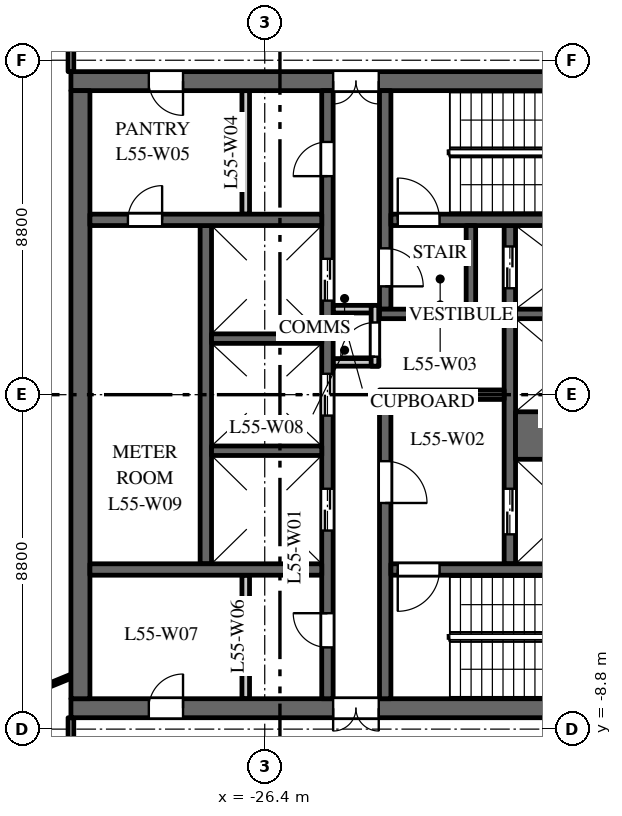
"""IFC4 building model, lengths in metres.
Left out: names, types, materials, properties, quantities, classifications, styles, units other than length and angle.
Written with IfcOpenShell. Run it as: python <this file> out.ifc"""

import sys

from ifc_helpers import new_model, si_unit, direction, frame, frame_2d, origin, place, context, subcontext, project, spatial, rectangle, extrude, element, fill, save


model = new_model("IFC4")
c1 = context("Model", 3, precision=1e-05, world=origin(), true_north=direction((0.0, 1.0)))
c2 = subcontext(c1, "Body", "Model", "MODEL_VIEW")
j1 = project(units=[si_unit("LENGTHUNIT", "METRE"), si_unit("PLANEANGLEUNIT", "RADIAN")], contexts=[c1])
p1 = place(None, origin())
s1 = spatial("IfcSite", under=j1, at=p1, CompositionType="ELEMENT")
p2 = place(p1, origin())
s2 = spatial("IfcBuilding", under=s1, at=p2, CompositionType="ELEMENT")
p3 = place(p2, frame((0.0, 0.0, 261.5)))
s3 = spatial("IfcBuildingStorey", under=s2, at=p3, CompositionType="ELEMENT", Elevation=261.5)
p4 = place(p3, frame((-16.5, 8.25, 0.0), z_axis=(0.0, 0.0, 1.0), x_axis=(-1.0, 0.0, 0.0)))
e1 = element("IfcWall", 1, at=p4, inside=s3, PredefinedType="SHEAR", context=c2, shape_type="SweptSolid", body=[
    extrude(rectangle(XDim=15.0, YDim=0.5, at=frame_2d((7.5, 0.0))), origin(), (0.0, 0.0, 1.0), 3.7),
])
p5 = place(p4, frame((6.9, 0.0, 0.0)))
e2 = element("IfcOpeningElement", 2, at=p5, cuts=e1, PredefinedType="OPENING", context=c2, shape_type="SweptSolid", body=[
    extrude(rectangle(XDim=1.2, YDim=2.1, at=frame_2d((0.6, 1.05))), frame((0.0, 0.26, 0.0), z_axis=(0.0, -1.0, 0.0), x_axis=(1.0, 0.0, 0.0)), (0.0, 0.0, 1.0), 0.52),
])
p6 = place(p4, frame((12.05, 0.0, 0.0)))
e3 = element("IfcOpeningElement", 3, at=p6, cuts=e1, PredefinedType="OPENING", context=c2, shape_type="SweptSolid", body=[
    extrude(rectangle(XDim=0.9, YDim=2.1, at=frame_2d((0.45, 1.05))), frame((0.0, 0.26, 0.0), z_axis=(0.0, -1.0, 0.0), x_axis=(1.0, 0.0, 0.0)), (0.0, 0.0, 1.0), 0.52),
])
p7 = place(p3, frame((-16.5, -8.25, 0.0), z_axis=(0.0, 0.0, 1.0), x_axis=(-1.0, 0.0, 0.0)))
e4 = element("IfcWall", 4, at=p7, inside=s3, PredefinedType="SHEAR", context=c2, shape_type="SweptSolid", body=[
    extrude(rectangle(XDim=15.0, YDim=0.5, at=frame_2d((7.5, 0.0))), origin(), (0.0, 0.0, 1.0), 3.7),
])
p8 = place(p7, frame((6.9, 0.0, 0.0)))
e5 = element("IfcOpeningElement", 5, at=p8, cuts=e4, PredefinedType="OPENING", context=c2, shape_type="SweptSolid", body=[
    extrude(rectangle(XDim=1.2, YDim=2.1, at=frame_2d((0.6, 1.05))), frame((0.0, 0.26, 0.0), z_axis=(0.0, -1.0, 0.0), x_axis=(1.0, 0.0, 0.0)), (0.0, 0.0, 1.0), 0.52),
])
p9 = place(p7, frame((12.05, 0.0, 0.0)))
e6 = element("IfcOpeningElement", 6, at=p9, cuts=e4, PredefinedType="OPENING", context=c2, shape_type="SweptSolid", body=[
    extrude(rectangle(XDim=0.9, YDim=2.1, at=frame_2d((0.45, 1.05))), frame((0.0, 0.26, 0.0), z_axis=(0.0, -1.0, 0.0), x_axis=(1.0, 0.0, 0.0)), (0.0, 0.0, 1.0), 0.52),
])
p10 = place(p3, frame((-27.95, -4.45, 0.0), z_axis=(0.0, 0.0, 1.0), x_axis=(0.0, 1.0, 0.0)))
e7 = element("IfcWall", 7, at=p10, inside=s3, PredefinedType="SHEAR", context=c2, shape_type="SweptSolid", body=[
    extrude(rectangle(XDim=8.9, YDim=0.3, at=frame_2d((4.45, 0.0))), origin(), (0.0, 0.0, 1.0), 3.7),
])
p11 = place(p3, frame((-19.95, -4.45, 0.0), z_axis=(0.0, 0.0, 1.0), x_axis=(0.0, 1.0, 0.0)))
e8 = element("IfcWall", 8, at=p11, inside=s3, PredefinedType="SHEAR", context=c2, shape_type="SweptSolid", body=[
    extrude(rectangle(XDim=8.9, YDim=0.3, at=frame_2d((4.45, 0.0))), origin(), (0.0, 0.0, 1.0), 3.7),
])
p12 = place(p11, frame((0.775, 0.0, 0.0)))
e9 = element("IfcOpeningElement", 9, at=p12, cuts=e8, PredefinedType="OPENING", context=c2, shape_type="SweptSolid", body=[
    extrude(rectangle(XDim=1.2, YDim=2.1, at=frame_2d((0.6, 1.05))), frame((0.0, 0.16, 0.0), z_axis=(0.0, -1.0, 0.0), x_axis=(1.0, 0.0, 0.0)), (0.0, 0.0, 1.0), 0.32),
])
p13 = place(p11, frame((7.25, 0.0, 0.0)))
e10 = element("IfcOpeningElement", 10, at=p13, cuts=e8, PredefinedType="OPENING", context=c2, shape_type="SweptSolid", body=[
    extrude(rectangle(XDim=1.1, YDim=2.1, at=frame_2d((0.55, 1.05))), frame((0.0, 0.16, 0.0), z_axis=(0.0, -1.0, 0.0), x_axis=(1.0, 0.0, 0.0)), (0.0, 0.0, 1.0), 0.32),
])
p14 = place(p3, frame((-24.75, -8.0, 0.0), z_axis=(0.0, 0.0, 1.0), x_axis=(0.0, 1.0, 0.0)))
e11 = element("IfcWall", 11, at=p14, inside=s3, PredefinedType="SHEAR", context=c2, shape_type="SweptSolid", body=[
    extrude(rectangle(XDim=16.0, YDim=0.3, at=frame_2d((8.0, 0.0))), origin(), (0.0, 0.0, 1.0), 3.7),
])
p15 = place(p14, frame((4.425, 0.0, 0.0)))
e12 = element("IfcOpeningElement", 12, at=p15, cuts=e11, PredefinedType="OPENING", context=c2, shape_type="SweptSolid", body=[
    extrude(rectangle(XDim=1.1, YDim=2.1, at=frame_2d((0.55, 1.05))), frame((0.0, 0.16, 0.0), z_axis=(0.0, -1.0, 0.0), x_axis=(1.0, 0.0, 0.0)), (0.0, 0.0, 1.0), 0.32),
])
p16 = place(p14, frame((7.45, 0.0, 0.0)))
e13 = element("IfcOpeningElement", 13, at=p16, cuts=e11, PredefinedType="OPENING", context=c2, shape_type="SweptSolid", body=[
    extrude(rectangle(XDim=1.1, YDim=2.1, at=frame_2d((0.55, 1.05))), frame((0.0, 0.16, 0.0), z_axis=(0.0, -1.0, 0.0), x_axis=(1.0, 0.0, 0.0)), (0.0, 0.0, 1.0), 0.32),
])
p17 = place(p14, frame((10.475, 0.0, 0.0)))
e14 = element("IfcOpeningElement", 14, at=p17, cuts=e11, PredefinedType="OPENING", context=c2, shape_type="SweptSolid", body=[
    extrude(rectangle(XDim=1.1, YDim=2.1, at=frame_2d((0.55, 1.05))), frame((0.0, 0.16, 0.0), z_axis=(0.0, -1.0, 0.0), x_axis=(1.0, 0.0, 0.0)), (0.0, 0.0, 1.0), 0.32),
])
p18 = place(p14, frame((13.75, 0.0, 0.0)))
e15 = element("IfcOpeningElement", 15, at=p18, cuts=e11, PredefinedType="OPENING", context=c2, shape_type="SweptSolid", body=[
    extrude(rectangle(XDim=0.9, YDim=2.1, at=frame_2d((0.45, 1.05))), frame((0.0, 0.16, 0.0), z_axis=(0.0, -1.0, 0.0), x_axis=(1.0, 0.0, 0.0)), (0.0, 0.0, 1.0), 0.32),
])
p19 = place(p14, frame((1.35, 0.0, 0.0)))
e16 = element("IfcOpeningElement", 16, at=p19, cuts=e11, PredefinedType="OPENING", context=c2, shape_type="SweptSolid", body=[
    extrude(rectangle(XDim=0.9, YDim=2.1, at=frame_2d((0.45, 1.05))), frame((0.0, 0.16, 0.0), z_axis=(0.0, -1.0, 0.0), x_axis=(1.0, 0.0, 0.0)), (0.0, 0.0, 1.0), 0.32),
])
p20 = place(p3, frame((-20.1, 0.0, 0.0), z_axis=(0.0, 0.0, 1.0), x_axis=(-1.0, 0.0, 0.0)))
e17 = element("IfcWall", 17, at=p20, inside=s3, PredefinedType="SHEAR", context=c2, shape_type="SweptSolid", body=[
    extrude(rectangle(XDim=3.28, YDim=0.25, at=frame_2d((1.64, 0.0))), origin(), (0.0, 0.0, 1.0), 3.7),
])
for number, where, z_axis, x_axis in (
    (18, (-23.4, 0.85, 0.0), (0.0, 0.0, 1.0), (-1.0, 0.0, 0.0)),
    (19, (-23.4, 2.25, 0.0), (0.0, 0.0, 1.0), (-1.0, 0.0, 0.0)),
):
    element("IfcWall", number, at=place(p3, frame(where, z_axis=z_axis, x_axis=x_axis)), inside=s3, PredefinedType="PARTITIONING", context=c2, shape_type="SweptSolid", body=[
        extrude(rectangle(XDim=1.2, YDim=0.2, at=frame_2d((0.6, 0.0))), origin(), (0.0, 0.0, 1.0), 3.7),
    ])
p21 = place(p3, frame((-23.5, 0.75, 0.0), z_axis=(0.0, 0.0, 1.0), x_axis=(0.0, 1.0, 0.0)))
e20 = element("IfcWall", 20, at=p21, inside=s3, PredefinedType="PARTITIONING", context=c2, shape_type="SweptSolid", body=[
    extrude(rectangle(XDim=1.6, YDim=0.2, at=frame_2d((0.8, 0.0))), origin(), (0.0, 0.0, 1.0), 3.7),
])
p22 = place(p21, frame((0.25, 0.0, 0.0)))
e21 = element("IfcOpeningElement", 21, at=p22, cuts=e20, PredefinedType="OPENING", context=c2, shape_type="SweptSolid", body=[
    extrude(rectangle(XDim=0.9, YDim=2.1, at=frame_2d((0.45, 1.05))), frame((0.0, 0.11, 0.0), z_axis=(0.0, -1.0, 0.0), x_axis=(1.0, 0.0, 0.0)), (0.0, 0.0, 1.0), 0.22),
])
p23 = place(p3, frame((-31.25, -8.0, 0.0), z_axis=(0.0, 0.0, 1.0), x_axis=(0.0, 1.0, 0.0)))
e22 = element("IfcWall", 22, at=p23, inside=s3, PredefinedType="SHEAR", context=c2, shape_type="SweptSolid", body=[
    extrude(rectangle(XDim=16.0, YDim=0.5, at=frame_2d((8.0, 0.0))), origin(), (0.0, 0.0, 1.0), 3.7),
])
p24 = place(p3, frame((-24.9, 4.6, 0.0), z_axis=(0.0, 0.0, 1.0), x_axis=(-1.0, 0.0, 0.0)))
e23 = element("IfcWall", 23, at=p24, inside=s3, PredefinedType="SHEAR", context=c2, shape_type="SweptSolid", body=[
    extrude(rectangle(XDim=6.1, YDim=0.3, at=frame_2d((3.05, 0.0))), origin(), (0.0, 0.0, 1.0), 3.7),
])
p25 = place(p24, frame((4.2, 0.0, 0.0)))
e24 = element("IfcOpeningElement", 24, at=p25, cuts=e23, PredefinedType="OPENING", context=c2, shape_type="SweptSolid", body=[
    extrude(rectangle(XDim=0.9, YDim=2.1, at=frame_2d((0.45, 1.05))), frame((0.0, 0.16, 0.0), z_axis=(0.0, -1.0, 0.0), x_axis=(1.0, 0.0, 0.0)), (0.0, 0.0, 1.0), 0.32),
])
for number, where, z_axis, x_axis in (
    (25, (-26.9, 4.75, 0.0), (0.0, 0.0, 1.0), (0.0, 1.0, 0.0)),
    (26, (-26.9, -8.0, 0.0), (0.0, 0.0, 1.0), (0.0, 1.0, 0.0)),
):
    element("IfcWall", number, at=place(p3, frame(where, z_axis=z_axis, x_axis=x_axis)), inside=s3, PredefinedType="PARTITIONING", context=c2, shape_type="SweptSolid", body=[
        extrude(rectangle(XDim=3.25, YDim=0.2, at=frame_2d((1.625, 0.0))), origin(), (0.0, 0.0, 1.0), 3.7),
    ])
p26 = place(p3, frame((-24.9, -4.6, 0.0), z_axis=(0.0, 0.0, 1.0), x_axis=(-1.0, 0.0, 0.0)))
e27 = element("IfcWall", 27, at=p26, inside=s3, PredefinedType="SHEAR", context=c2, shape_type="SweptSolid", body=[
    extrude(rectangle(XDim=6.1, YDim=0.3, at=frame_2d((3.05, 0.0))), origin(), (0.0, 0.0, 1.0), 3.7),
])
p27 = place(p3, frame((-16.9, -1.075, 0.0), z_axis=(0.0, 0.0, 1.0), x_axis=(-1.0, 0.0, 0.0)))
e28 = element("IfcWall", 28, at=p27, inside=s3, PredefinedType="SHEAR", context=c2, shape_type="SweptSolid", body=[
    extrude(rectangle(XDim=2.9, YDim=1.25, at=frame_2d((1.45, 0.0))), origin(), (0.0, 0.0, 1.0), 3.7),
])
for number, where, z_axis, x_axis in (
    (29, (-16.9, 2.125, 0.0), (0.0, 0.0, 1.0), (-1.0, 0.0, 0.0)),
    (30, (-24.9, -1.475, 0.0), (0.0, 0.0, 1.0), (-1.0, 0.0, 0.0)),
    (31, (-24.9, 1.475, 0.0), (0.0, 0.0, 1.0), (-1.0, 0.0, 0.0)),
):
    element("IfcWall", number, at=place(p3, frame(where, z_axis=z_axis, x_axis=x_axis)), inside=s3, PredefinedType="SHEAR", context=c2, shape_type="SweptSolid", body=[
        extrude(rectangle(XDim=2.9, YDim=0.25, at=frame_2d((1.45, 0.0))), origin(), (0.0, 0.0, 1.0), 3.7),
    ])
p28 = place(p3, frame((-23.23, 2.25, 0.0), z_axis=(0.0, 0.0, 1.0), x_axis=(0.0, 1.0, 0.0)))
e32 = element("IfcWall", 32, at=p28, inside=s3, PredefinedType="SHEAR", context=c2, shape_type="SweptSolid", body=[
    extrude(rectangle(XDim=5.75, YDim=0.3, at=frame_2d((2.875, 0.0))), origin(), (0.0, 0.0, 1.0), 3.7),
])
p29 = place(p28, frame((0.6, 0.0, 0.0)))
e33 = element("IfcOpeningElement", 33, at=p29, cuts=e32, PredefinedType="OPENING", context=c2, shape_type="SweptSolid", body=[
    extrude(rectangle(XDim=1.0, YDim=2.1, at=frame_2d((0.5, 1.05))), frame((0.0, 0.16, 0.0), z_axis=(0.0, -1.0, 0.0), x_axis=(1.0, 0.0, 0.0)), (0.0, 0.0, 1.0), 0.32),
])
p30 = place(p3, frame((-23.23, -8.0, 0.0), z_axis=(0.0, 0.0, 1.0), x_axis=(0.0, 1.0, 0.0)))
e34 = element("IfcWall", 34, at=p30, inside=s3, PredefinedType="SHEAR", context=c2, shape_type="SweptSolid", body=[
    extrude(rectangle(XDim=7.875, YDim=0.3, at=frame_2d((3.938, 0.0))), origin(), (0.0, 0.0, 1.0), 3.7),
])
p31 = place(p30, frame((5.15, 0.0, 0.0)))
e35 = element("IfcOpeningElement", 35, at=p31, cuts=e34, PredefinedType="OPENING", context=c2, shape_type="SweptSolid", body=[
    extrude(rectangle(XDim=1.1, YDim=2.1, at=frame_2d((0.55, 1.05))), frame((0.0, 0.16, 0.0), z_axis=(0.0, -1.0, 0.0), x_axis=(1.0, 0.0, 0.0)), (0.0, 0.0, 1.0), 0.32),
])
p32 = place(p3, frame((-16.9, 4.6, 0.0), z_axis=(0.0, 0.0, 1.0), x_axis=(-1.0, 0.0, 0.0)))
e36 = element("IfcWall", 36, at=p32, inside=s3, PredefinedType="SHEAR", context=c2, shape_type="SweptSolid", body=[
    extrude(rectangle(XDim=6.18, YDim=0.3, at=frame_2d((3.09, 0.0))), origin(), (0.0, 0.0, 1.0), 3.7),
])
p33 = place(p32, frame((4.9, 0.0, 0.0)))
e37 = element("IfcOpeningElement", 37, at=p33, cuts=e36, PredefinedType="OPENING", context=c2, shape_type="SweptSolid", body=[
    extrude(rectangle(XDim=1.1, YDim=2.1, at=frame_2d((0.55, 1.05))), frame((0.0, 0.16, 0.0), z_axis=(0.0, -1.0, 0.0), x_axis=(1.0, 0.0, 0.0)), (0.0, 0.0, 1.0), 0.32),
])
p34 = place(p3, frame((-16.9, -4.6, 0.0), z_axis=(0.0, 0.0, 1.0), x_axis=(-1.0, 0.0, 0.0)))
e38 = element("IfcWall", 38, at=p34, inside=s3, PredefinedType="SHEAR", context=c2, shape_type="SweptSolid", body=[
    extrude(rectangle(XDim=6.18, YDim=0.3, at=frame_2d((3.09, 0.0))), origin(), (0.0, 0.0, 1.0), 3.7),
])
p35 = place(p34, frame((4.9, 0.0, 0.0)))
e39 = element("IfcOpeningElement", 39, at=p35, cuts=e38, PredefinedType="OPENING", context=c2, shape_type="SweptSolid", body=[
    extrude(rectangle(XDim=1.1, YDim=2.1, at=frame_2d((0.55, 1.05))), frame((0.0, 0.16, 0.0), z_axis=(0.0, -1.0, 0.0), x_axis=(1.0, 0.0, 0.0)), (0.0, 0.0, 1.0), 0.32),
])
p36 = place(p3, frame((-20.85, 2.125, 0.0), z_axis=(0.0, 0.0, 1.0), x_axis=(-1.0, 0.0, 0.0)))
e40 = element("IfcWall", 40, at=p36, inside=s3, PredefinedType="SHEAR", context=c2, shape_type="SweptSolid", body=[
    extrude(rectangle(XDim=2.53, YDim=0.25, at=frame_2d((1.265, 0.0))), origin(), (0.0, 0.0, 1.0), 3.7),
])
p37 = place(p3, frame((-20.975, 2.25, 0.0), z_axis=(0.0, 0.0, 1.0), x_axis=(0.0, 1.0, 0.0)))
e41 = element("IfcWall", 41, at=p37, inside=s3, PredefinedType="SHEAR", context=c2, shape_type="SweptSolid", body=[
    extrude(rectangle(XDim=2.2, YDim=0.25, at=frame_2d((1.1, 0.0))), origin(), (0.0, 0.0, 1.0), 3.7),
])
p38 = place(p3, frame((-34.234, -8.53, 0.0), z_axis=(0.0, 0.0, 1.0), x_axis=(0.925344112436, 0.379128307542, 0.0)))
e42 = element("IfcWall", 42, at=p38, inside=s3, PredefinedType="PARTITIONING", context=c2, shape_type="SweptSolid", body=[
    extrude(rectangle(XDim=2.954, YDim=0.1, at=frame_2d((1.477, 0.0))), origin(), (0.0, 0.0, 1.0), 3.0),
])
for number, where, z_axis, x_axis in (
    (43, (-31.5, -10.7, 0.0), (0.0, 0.0, 1.0), (0.0, 1.0, 0.0)),
    (44, (-31.5, 8.5, 0.0), (0.0, 0.0, 1.0), (0.0, 1.0, 0.0)),
):
    element("IfcWall", number, at=place(p3, frame(where, z_axis=z_axis, x_axis=x_axis)), inside=s3, PredefinedType="PARTITIONING", context=c2, shape_type="SweptSolid", body=[
        extrude(rectangle(XDim=2.2, YDim=0.15, at=frame_2d((1.1, 0.0))), origin(), (0.0, 0.0, 1.0), 3.7),
    ])
p39 = place(p12, origin())
e45 = element("IfcDoor", 45, at=p39, inside=s3, OperationType="DOUBLE_DOOR_SLIDING", PredefinedType="DOOR", context=c2, shape_type="SweptSolid", body=[
    extrude(rectangle(XDim=1.2, YDim=2.1, at=frame_2d((0.6, 1.05))), frame((0.0, 0.025, 0.0), z_axis=(0.0, -1.0, 0.0), x_axis=(1.0, 0.0, 0.0)), (0.0, 0.0, 1.0), 0.05),
])
fill(e9, e45)
p40 = place(p13, origin())
e46 = element("IfcDoor", 46, at=p40, inside=s3, OperationType="DOUBLE_DOOR_SLIDING", PredefinedType="DOOR", context=c2, shape_type="SweptSolid", body=[
    extrude(rectangle(XDim=1.1, YDim=2.1, at=frame_2d((0.55, 1.05))), frame((0.0, 0.025, 0.0), z_axis=(0.0, -1.0, 0.0), x_axis=(1.0, 0.0, 0.0)), (0.0, 0.0, 1.0), 0.05),
])
fill(e10, e46)
p41 = place(p15, origin())
e47 = element("IfcDoor", 47, at=p41, inside=s3, OperationType="DOUBLE_DOOR_SLIDING", PredefinedType="DOOR", context=c2, shape_type="SweptSolid", body=[
    extrude(rectangle(XDim=1.1, YDim=2.1, at=frame_2d((0.55, 1.05))), frame((0.0, 0.025, 0.0), z_axis=(0.0, -1.0, 0.0), x_axis=(1.0, 0.0, 0.0)), (0.0, 0.0, 1.0), 0.05),
])
fill(e12, e47)
p42 = place(p16, origin())
e48 = element("IfcDoor", 48, at=p42, inside=s3, OperationType="DOUBLE_DOOR_SLIDING", PredefinedType="DOOR", context=c2, shape_type="SweptSolid", body=[
    extrude(rectangle(XDim=1.1, YDim=2.1, at=frame_2d((0.55, 1.05))), frame((0.0, 0.025, 0.0), z_axis=(0.0, -1.0, 0.0), x_axis=(1.0, 0.0, 0.0)), (0.0, 0.0, 1.0), 0.05),
])
fill(e13, e48)
p43 = place(p17, origin())
e49 = element("IfcDoor", 49, at=p43, inside=s3, OperationType="DOUBLE_DOOR_SLIDING", PredefinedType="DOOR", context=c2, shape_type="SweptSolid", body=[
    extrude(rectangle(XDim=1.1, YDim=2.1, at=frame_2d((0.55, 1.05))), frame((0.0, 0.025, 0.0), z_axis=(0.0, -1.0, 0.0), x_axis=(1.0, 0.0, 0.0)), (0.0, 0.0, 1.0), 0.05),
])
fill(e14, e49)
p44 = place(p33, origin())
e50 = element("IfcDoor", 50, at=p44, inside=s3, OperationType="SINGLE_SWING_RIGHT", PredefinedType="DOOR", context=c2, shape_type="SweptSolid", body=[
    extrude(rectangle(XDim=1.1, YDim=2.1, at=frame_2d((0.55, 1.05))), frame((0.0, 0.025, 0.0), z_axis=(0.0, -1.0, 0.0), x_axis=(1.0, 0.0, 0.0)), (0.0, 0.0, 1.0), 0.05),
])
fill(e37, e50)
p45 = place(p35, origin())
e51 = element("IfcDoor", 51, at=p45, inside=s3, OperationType="SINGLE_SWING_LEFT", PredefinedType="DOOR", context=c2, shape_type="SweptSolid", body=[
    extrude(rectangle(XDim=1.1, YDim=2.1, at=frame_2d((0.55, 1.05))), frame((0.0, 0.025, 0.0), z_axis=(0.0, -1.0, 0.0), x_axis=(1.0, 0.0, 0.0)), (0.0, 0.0, 1.0), 0.05),
])
fill(e39, e51)
p46 = place(p31, origin())
e52 = element("IfcDoor", 52, at=p46, inside=s3, OperationType="SINGLE_SWING_LEFT", PredefinedType="DOOR", context=c2, shape_type="SweptSolid", body=[
    extrude(rectangle(XDim=1.1, YDim=2.1, at=frame_2d((0.55, 1.05))), frame((0.0, 0.025, 0.0), z_axis=(0.0, -1.0, 0.0), x_axis=(1.0, 0.0, 0.0)), (0.0, 0.0, 1.0), 0.05),
])
fill(e35, e52)
p47 = place(p29, origin())
e53 = element("IfcDoor", 53, at=p47, inside=s3, OperationType="SINGLE_SWING_LEFT", PredefinedType="DOOR", context=c2, shape_type="SweptSolid", body=[
    extrude(rectangle(XDim=1.0, YDim=2.1, at=frame_2d((0.5, 1.05))), frame((0.0, 0.025, 0.0), z_axis=(0.0, -1.0, 0.0), x_axis=(1.0, 0.0, 0.0)), (0.0, 0.0, 1.0), 0.05),
])
fill(e33, e53)
p48 = place(p5, origin())
e54 = element("IfcDoor", 54, at=p48, inside=s3, OperationType="DOUBLE_DOOR_DOUBLE_SWING", PredefinedType="DOOR", context=c2, shape_type="SweptSolid", body=[
    extrude(rectangle(XDim=1.2, YDim=2.1, at=frame_2d((0.6, 1.05))), frame((0.0, 0.025, 0.0), z_axis=(0.0, -1.0, 0.0), x_axis=(1.0, 0.0, 0.0)), (0.0, 0.0, 1.0), 0.05),
])
fill(e2, e54)
p49 = place(p8, origin())
e55 = element("IfcDoor", 55, at=p49, inside=s3, OperationType="DOUBLE_DOOR_DOUBLE_SWING", PredefinedType="DOOR", context=c2, shape_type="SweptSolid", body=[
    extrude(rectangle(XDim=1.2, YDim=2.1, at=frame_2d((0.6, 1.05))), frame((0.0, 0.025, 0.0), z_axis=(0.0, -1.0, 0.0), x_axis=(1.0, 0.0, 0.0)), (0.0, 0.0, 1.0), 0.05),
])
fill(e5, e55)
p50 = place(p18, origin())
e56 = element("IfcDoor", 56, at=p50, inside=s3, OperationType="SINGLE_SWING_RIGHT", PredefinedType="DOOR", context=c2, shape_type="SweptSolid", body=[
    extrude(rectangle(XDim=0.9, YDim=2.1, at=frame_2d((0.45, 1.05))), frame((0.0, 0.025, 0.0), z_axis=(0.0, -1.0, 0.0), x_axis=(1.0, 0.0, 0.0)), (0.0, 0.0, 1.0), 0.05),
])
fill(e15, e56)
p51 = place(p6, origin())
e57 = element("IfcDoor", 57, at=p51, inside=s3, OperationType="SINGLE_SWING_RIGHT", PredefinedType="DOOR", context=c2, shape_type="SweptSolid", body=[
    extrude(rectangle(XDim=0.9, YDim=2.1, at=frame_2d((0.45, 1.05))), frame((0.0, 0.025, 0.0), z_axis=(0.0, -1.0, 0.0), x_axis=(1.0, 0.0, 0.0)), (0.0, 0.0, 1.0), 0.05),
])
fill(e3, e57)
p52 = place(p19, origin())
e58 = element("IfcDoor", 58, at=p52, inside=s3, OperationType="SINGLE_SWING_LEFT", PredefinedType="DOOR", context=c2, shape_type="SweptSolid", body=[
    extrude(rectangle(XDim=0.9, YDim=2.1, at=frame_2d((0.45, 1.05))), frame((0.0, 0.025, 0.0), z_axis=(0.0, -1.0, 0.0), x_axis=(1.0, 0.0, 0.0)), (0.0, 0.0, 1.0), 0.05),
])
fill(e16, e58)
p53 = place(p9, origin())
e59 = element("IfcDoor", 59, at=p53, inside=s3, OperationType="SINGLE_SWING_LEFT", PredefinedType="DOOR", context=c2, shape_type="SweptSolid", body=[
    extrude(rectangle(XDim=0.9, YDim=2.1, at=frame_2d((0.45, 1.05))), frame((0.0, 0.025, 0.0), z_axis=(0.0, -1.0, 0.0), x_axis=(1.0, 0.0, 0.0)), (0.0, 0.0, 1.0), 0.05),
])
fill(e6, e59)
p54 = place(p22, origin())
e60 = element("IfcDoor", 60, at=p54, inside=s3, OperationType="SINGLE_SWING_RIGHT", PredefinedType="DOOR", context=c2, shape_type="SweptSolid", body=[
    extrude(rectangle(XDim=0.9, YDim=2.1, at=frame_2d((0.45, 1.05))), frame((0.0, 0.025, 0.0), z_axis=(0.0, -1.0, 0.0), x_axis=(1.0, 0.0, 0.0)), (0.0, 0.0, 1.0), 0.05),
])
fill(e21, e60)
p55 = place(p25, origin())
e61 = element("IfcDoor", 61, at=p55, inside=s3, OperationType="SINGLE_SWING_LEFT", PredefinedType="DOOR", context=c2, shape_type="SweptSolid", body=[
    extrude(rectangle(XDim=0.9, YDim=2.1, at=frame_2d((0.45, 1.05))), frame((0.0, 0.025, 0.0), z_axis=(0.0, -1.0, 0.0), x_axis=(1.0, 0.0, 0.0)), (0.0, 0.0, 1.0), 0.05),
])
fill(e24, e61)
save(model, sys.argv[1])
